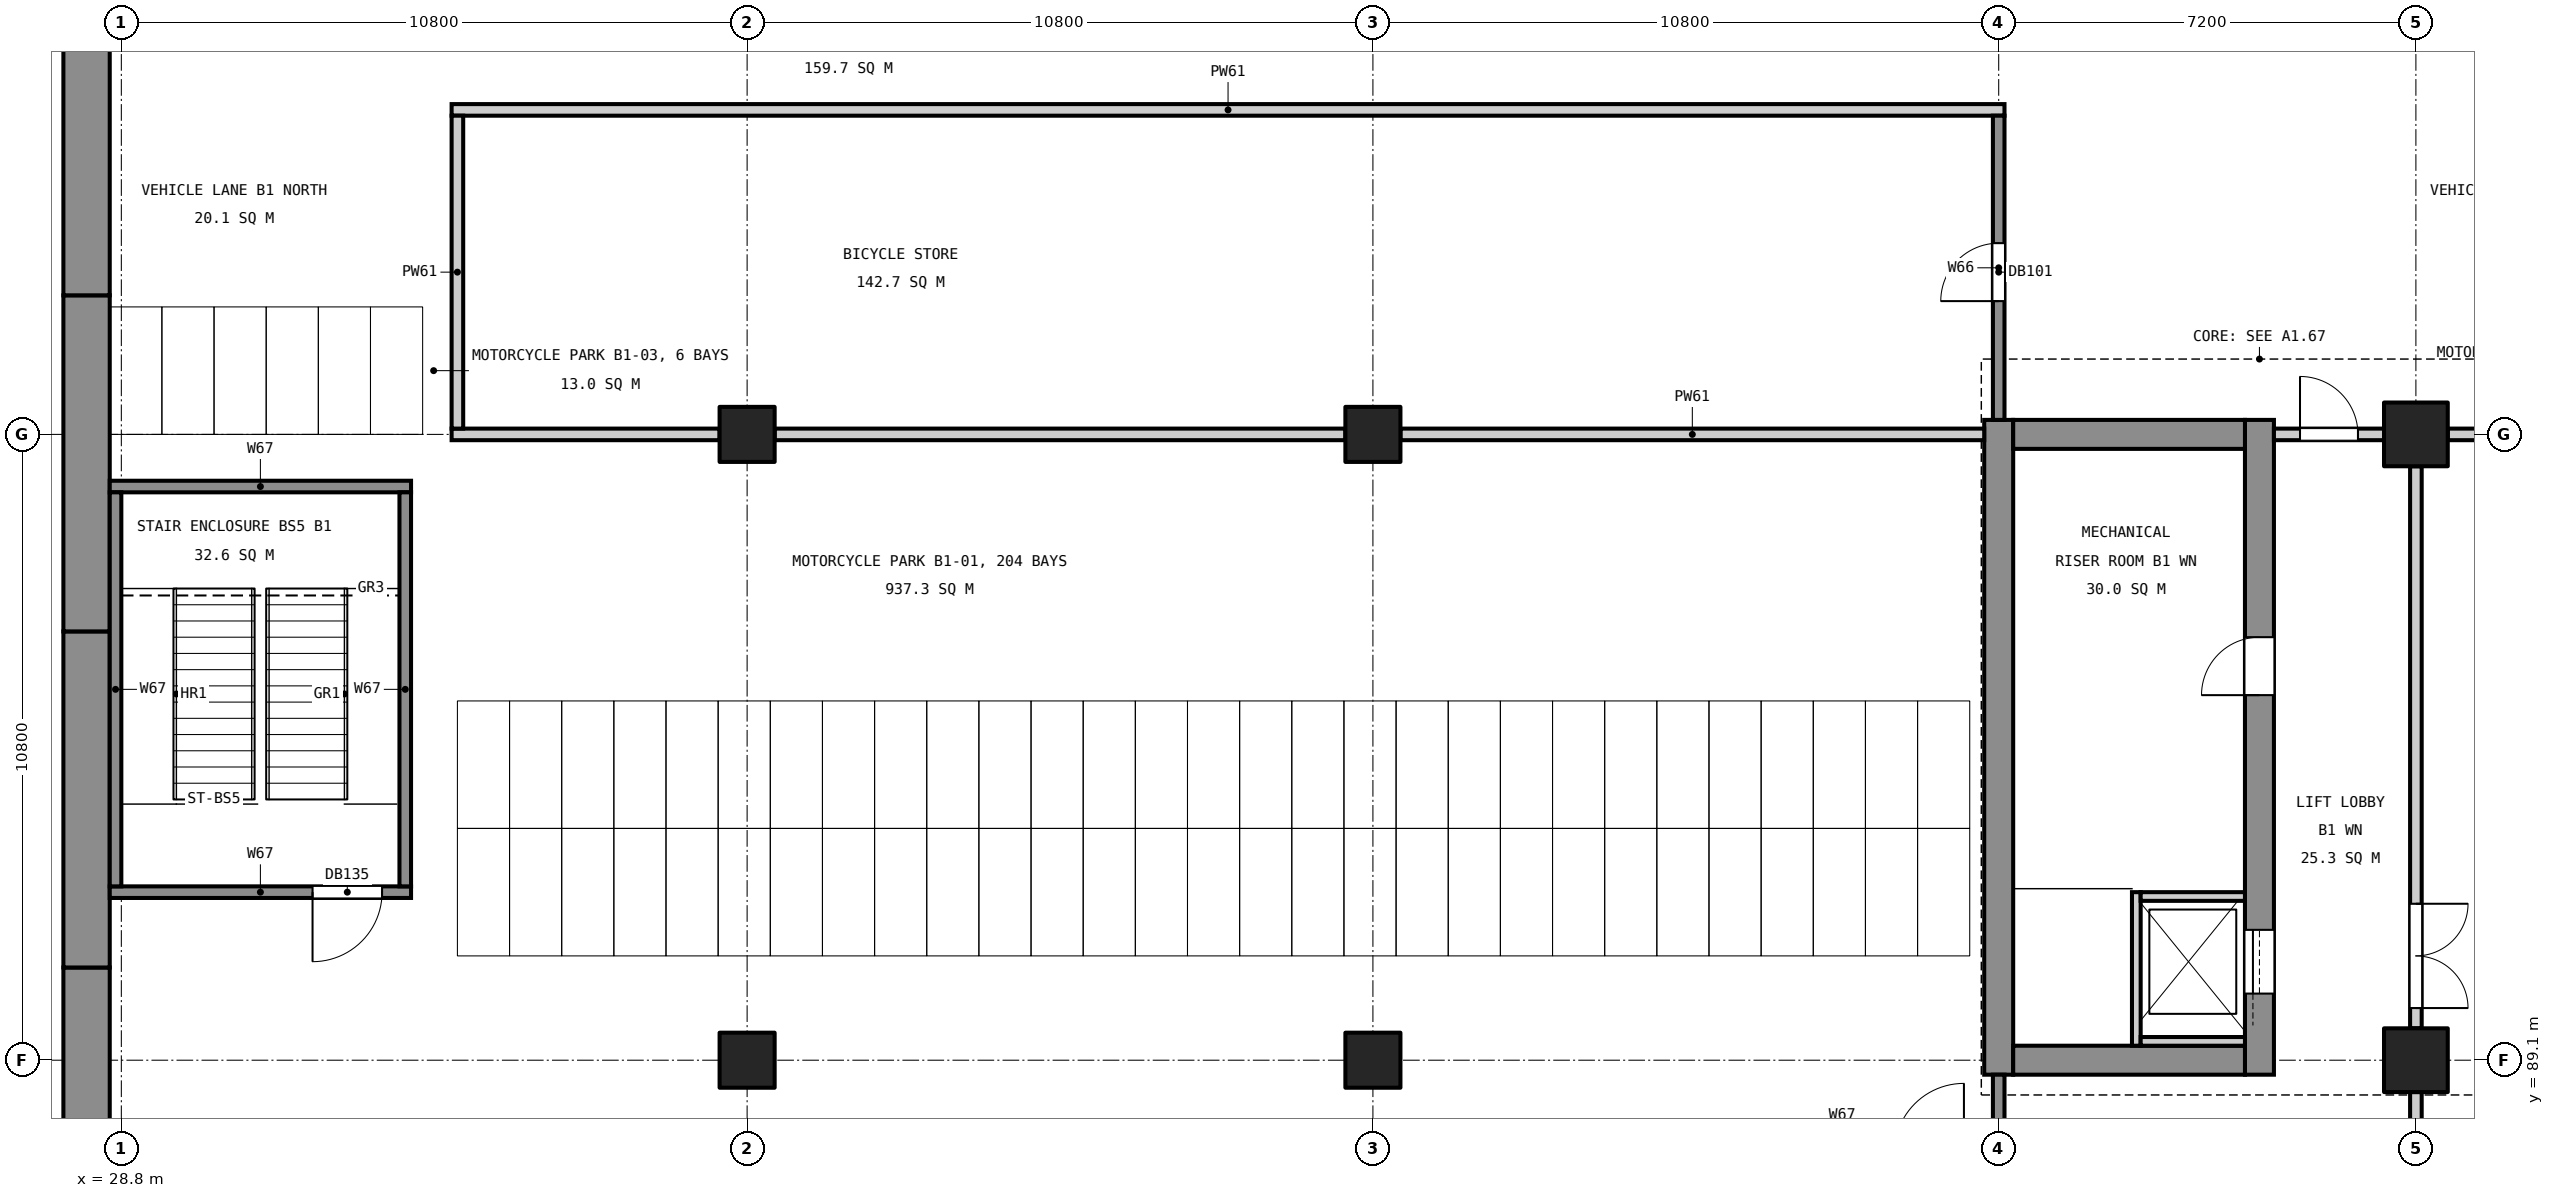
"""IFC4 building model, lengths in metres.
Left out: names, types, materials, properties, quantities, classifications, styles, units other than length and angle.
Written with IfcOpenShell. Run it as: python <this file> out.ifc"""

import sys

from ifc_helpers import new_model, si_unit, direction, frame, frame_2d, origin, origin_2d, place, context, subcontext, project, spatial, rectangle, extrude, element, fill, save


model = new_model("IFC4")
c1 = context("Model", 3, precision=1e-05, world=origin(), true_north=direction((0.0, 1.0)))
c2 = subcontext(c1, "Body", "Model", "MODEL_VIEW")
j1 = project(units=[si_unit("LENGTHUNIT", "METRE"), si_unit("PLANEANGLEUNIT", "RADIAN")], contexts=[c1])
p1 = place(None, origin())
s1 = spatial("IfcSite", under=j1, at=p1, CompositionType="ELEMENT")
p2 = place(p1, origin())
s2 = spatial("IfcBuilding", under=s1, at=p2, CompositionType="ELEMENT")
p3 = place(p2, frame((0.0, 0.0, -4.8)))
s3 = spatial("IfcBuildingStorey", under=s2, at=p3, CompositionType="ELEMENT", Elevation=-4.8)
for number, where, z_axis, x_axis in (
    (1, (68.4, 89.1, 0.0), (0.0, 0.0, 1.0), (1.0, 0.0, 0.0)),
    (2, (68.4, 99.9, 0.0), (0.0, 0.0, 1.0), (1.0, 0.0, 0.0)),
):
    element("IfcColumn", number, at=place(p3, frame(where, z_axis=z_axis, x_axis=x_axis)), inside=s3, PredefinedType="COLUMN", context=c2, shape_type="SweptSolid", body=[
        extrude(rectangle(XDim=1.1, YDim=1.1, at=origin_2d()), origin(), (0.0, 0.0, 1.0), 4.5),
    ])
for number, where, z_axis, x_axis in (
    (3, (39.6, 89.1, 0.0), (0.0, 0.0, 1.0), (1.0, 0.0, 0.0)),
    (4, (39.6, 99.9, 0.0), (0.0, 0.0, 1.0), (1.0, 0.0, 0.0)),
    (5, (50.4, 89.1, 0.0), (0.0, 0.0, 1.0), (1.0, 0.0, 0.0)),
    (6, (50.4, 99.9, 0.0), (0.0, 0.0, 1.0), (1.0, 0.0, 0.0)),
):
    element("IfcColumn", number, at=place(p3, frame(where, z_axis=z_axis, x_axis=x_axis)), inside=s3, PredefinedType="COLUMN", context=c2, shape_type="SweptSolid", body=[
        extrude(rectangle(XDim=0.95, YDim=0.95, at=origin_2d()), origin(), (0.0, 0.0, 1.0), 4.35),
    ])
for number, where, z_axis, x_axis in (
    (7, (28.2, 84.9, -18.2), (0.0, 0.0, 1.0), (0.0, 1.0, 0.0)),
    (8, (28.2, 90.7, -18.2), (0.0, 0.0, 1.0), (0.0, 1.0, 0.0)),
    (9, (28.2, 96.5, -18.2), (0.0, 0.0, 1.0), (0.0, 1.0, 0.0)),
    (10, (28.2, 102.3, -18.2), (0.0, 0.0, 1.0), (0.0, 1.0, 0.0)),
):
    element("IfcWall", number, at=place(p3, frame(where, z_axis=z_axis, x_axis=x_axis)), inside=s3, PredefinedType="SOLIDWALL", context=c2, shape_type="SweptSolid", body=[
        extrude(rectangle(XDim=5.8, YDim=0.8, at=frame_2d((2.9, 0.0))), origin(), (0.0, 0.0, 1.0), 21.55),
    ])
p4 = place(p3, frame((61.2, 88.85, 0.0), z_axis=(0.0, 0.0, 1.0), x_axis=(0.0, 1.0, 0.0)))
e11 = element("IfcWall", 11, at=p4, inside=s3, PredefinedType="SHEAR", context=c2, shape_type="SweptSolid", body=[
    extrude(rectangle(XDim=11.3, YDim=0.5, at=frame_2d((5.65, 0.0))), origin(), (0.0, 0.0, 1.0), 4.5),
])
p5 = place(p3, frame((65.7, 88.85, 0.0), z_axis=(0.0, 0.0, 1.0), x_axis=(0.0, 1.0, 0.0)))
e12 = element("IfcWall", 12, at=p5, inside=s3, PredefinedType="SHEAR", context=c2, shape_type="SweptSolid", body=[
    extrude(rectangle(XDim=11.3, YDim=0.5, at=frame_2d((5.65, 0.0))), origin(), (0.0, 0.0, 1.0), 4.5),
])
p6 = place(p5, frame((1.4, 0.0, 0.0)))
e13 = element("IfcOpeningElement", 13, at=p6, cuts=e12, PredefinedType="OPENING", context=c2, shape_type="SweptSolid", body=[
    extrude(rectangle(XDim=1.1, YDim=2.1, at=frame_2d((0.55, 1.05))), frame((0.0, 0.26, 0.0), z_axis=(0.0, -1.0, 0.0), x_axis=(1.0, 0.0, 0.0)), (0.0, 0.0, 1.0), 0.52),
])
p7 = place(p5, frame((6.55, 0.0, 0.0)))
e14 = element("IfcOpeningElement", 14, at=p7, cuts=e12, PredefinedType="OPENING", context=c2, shape_type="SweptSolid", body=[
    extrude(rectangle(XDim=1.0, YDim=2.1, at=frame_2d((0.5, 1.05))), frame((0.0, 0.26, 0.0), z_axis=(0.0, -1.0, 0.0), x_axis=(1.0, 0.0, 0.0)), (0.0, 0.0, 1.0), 0.52),
])
for number, where, z_axis, x_axis in (
    (15, (61.45, 89.1, 0.0), (0.0, 0.0, 1.0), (1.0, 0.0, 0.0)),
    (16, (61.45, 99.9, 0.0), (0.0, 0.0, 1.0), (1.0, 0.0, 0.0)),
):
    element("IfcWall", number, at=place(p3, frame(where, z_axis=z_axis, x_axis=x_axis)), inside=s3, PredefinedType="SHEAR", context=c2, shape_type="SweptSolid", body=[
        extrude(rectangle(XDim=4.0, YDim=0.5, at=frame_2d((2.0, 0.0))), origin(), (0.0, 0.0, 1.0), 4.5),
    ])
p8 = place(p3, frame((63.575, 92.0, 0.0), z_axis=(0.0, 0.0, 1.0), x_axis=(0.0, -1.0, 0.0)))
e17 = element("IfcWall", 17, at=p8, inside=s3, PredefinedType="SOLIDWALL", context=c2, shape_type="SweptSolid", body=[
    extrude(rectangle(XDim=2.65, YDim=0.15, at=frame_2d((1.325, 0.0))), origin(), (0.0, 0.0, 1.0), 4.8),
])
for number, where, z_axis, x_axis in (
    (18, (63.65, 91.925, 0.0), (0.0, 0.0, 1.0), (1.0, 0.0, 0.0)),
    (19, (63.65, 89.425, 0.0), (0.0, 0.0, 1.0), (1.0, 0.0, 0.0)),
):
    element("IfcWall", number, at=place(p3, frame(where, z_axis=z_axis, x_axis=x_axis)), inside=s3, PredefinedType="SOLIDWALL", context=c2, shape_type="SweptSolid", body=[
        extrude(rectangle(XDim=1.8, YDim=0.15, at=frame_2d((0.9, 0.0))), origin(), (0.0, 0.0, 1.0), 4.8),
    ])
p9 = place(p3, frame((28.6, 92.0, 0.0), z_axis=(0.0, 0.0, 1.0), x_axis=(1.0, 0.0, 0.0)))
e20 = element("IfcWall", 20, at=p9, inside=s3, PredefinedType="SOLIDWALL", context=c2, shape_type="SweptSolid", body=[
    extrude(rectangle(XDim=5.2, YDim=0.2, at=frame_2d((2.6, 0.0))), origin(), (0.0, 0.0, 1.0), 4.35),
])
p10 = place(p9, frame((3.5, 0.0, 0.0)))
e21 = element("IfcOpeningElement", 21, at=p10, cuts=e20, PredefinedType="OPENING", context=c2, shape_type="SweptSolid", body=[
    extrude(rectangle(XDim=1.2, YDim=2.1, at=frame_2d((0.6, 1.05))), frame((0.0, 0.11, 0.0), z_axis=(0.0, -1.0, 0.0), x_axis=(1.0, 0.0, 0.0)), (0.0, 0.0, 1.0), 0.22),
])
p11 = place(p3, frame((28.6, 99.0, 0.0), z_axis=(0.0, 0.0, 1.0), x_axis=(1.0, 0.0, 0.0)))
e22 = element("IfcWall", 22, at=p11, inside=s3, PredefinedType="SOLIDWALL", context=c2, shape_type="SweptSolid", body=[
    extrude(rectangle(XDim=5.2, YDim=0.2, at=frame_2d((2.6, 0.0))), origin(), (0.0, 0.0, 1.0), 4.35),
])
p12 = place(p3, frame((34.5, 99.9, 0.0), z_axis=(0.0, 0.0, 1.0), x_axis=(1.0, 0.0, 0.0)))
e23 = element("IfcWall", 23, at=p12, inside=s3, PredefinedType="PARTITIONING", context=c2, shape_type="SweptSolid", body=[
    extrude(rectangle(XDim=4.625, YDim=0.2, at=frame_2d((2.312, 0.0))), origin(), (0.0, 0.0, 1.0), 4.35),
])
p13 = place(p3, frame((40.075, 99.9, 0.0), z_axis=(0.0, 0.0, 1.0), x_axis=(1.0, 0.0, 0.0)))
e24 = element("IfcWall", 24, at=p13, inside=s3, PredefinedType="PARTITIONING", context=c2, shape_type="SweptSolid", body=[
    extrude(rectangle(XDim=9.85, YDim=0.2, at=frame_2d((4.925, 0.0))), origin(), (0.0, 0.0, 1.0), 4.35),
])
p14 = place(p3, frame((50.875, 99.9, 0.0), z_axis=(0.0, 0.0, 1.0), x_axis=(1.0, 0.0, 0.0)))
e25 = element("IfcWall", 25, at=p14, inside=s3, PredefinedType="PARTITIONING", context=c2, shape_type="SweptSolid", body=[
    extrude(rectangle(XDim=10.075, YDim=0.2, at=frame_2d((5.038, 0.0))), origin(), (0.0, 0.0, 1.0), 4.35),
])
p15 = place(p3, frame((65.95, 99.9, 0.0), z_axis=(0.0, 0.0, 1.0), x_axis=(1.0, 0.0, 0.0)))
e26 = element("IfcWall", 26, at=p15, inside=s3, PredefinedType="PARTITIONING", context=c2, shape_type="SweptSolid", body=[
    extrude(rectangle(XDim=1.9, YDim=0.2, at=frame_2d((0.95, 0.0))), origin(), (0.0, 0.0, 1.0), 3.7),
])
p16 = place(p15, frame((0.45, 0.0, 0.0)))
e27 = element("IfcOpeningElement", 27, at=p16, cuts=e26, PredefinedType="OPENING", context=c2, shape_type="SweptSolid", body=[
    extrude(rectangle(XDim=1.0, YDim=2.1, at=frame_2d((0.5, 1.05))), frame((0.0, 0.11, 0.0), z_axis=(0.0, -1.0, 0.0), x_axis=(1.0, 0.0, 0.0)), (0.0, 0.0, 1.0), 0.22),
])
p17 = place(p3, frame((68.95, 99.9, 0.0), z_axis=(0.0, 0.0, 1.0), x_axis=(1.0, 0.0, 0.0)))
e28 = element("IfcWall", 28, at=p17, inside=s3, PredefinedType="PARTITIONING", context=c2, shape_type="SweptSolid", body=[
    extrude(rectangle(XDim=9.7, YDim=0.2, at=frame_2d((4.85, 0.0))), origin(), (0.0, 0.0, 1.0), 3.7),
])
p18 = place(p3, frame((34.5, 105.5, 0.0), z_axis=(0.0, 0.0, 1.0), x_axis=(1.0, 0.0, 0.0)))
e29 = element("IfcWall", 29, at=p18, inside=s3, PredefinedType="PARTITIONING", context=c2, shape_type="SweptSolid", body=[
    extrude(rectangle(XDim=26.8, YDim=0.2, at=frame_2d((13.4, 0.0))), origin(), (0.0, 0.0, 1.0), 4.35),
])
for number, where, z_axis, x_axis in (
    (30, (28.7, 92.1, 0.0), (0.0, 0.0, 1.0), (0.0, 1.0, 0.0)),
    (31, (33.7, 92.1, 0.0), (0.0, 0.0, 1.0), (0.0, 1.0, 0.0)),
):
    element("IfcWall", number, at=place(p3, frame(where, z_axis=z_axis, x_axis=x_axis)), inside=s3, PredefinedType="SOLIDWALL", context=c2, shape_type="SweptSolid", body=[
        extrude(rectangle(XDim=6.8, YDim=0.2, at=frame_2d((3.4, 0.0))), origin(), (0.0, 0.0, 1.0), 4.35),
    ])
p19 = place(p3, frame((34.6, 100.0, 0.0), z_axis=(0.0, 0.0, 1.0), x_axis=(0.0, 1.0, 0.0)))
e32 = element("IfcWall", 32, at=p19, inside=s3, PredefinedType="PARTITIONING", context=c2, shape_type="SweptSolid", body=[
    extrude(rectangle(XDim=5.4, YDim=0.2, at=frame_2d((2.7, 0.0))), origin(), (0.0, 0.0, 1.0), 4.35),
])
p20 = place(p3, frame((61.2, 78.85, 0.0), z_axis=(0.0, 0.0, 1.0), x_axis=(0.0, 1.0, 0.0)))
e33 = element("IfcWall", 33, at=p20, inside=s3, PredefinedType="SOLIDWALL", context=c2, shape_type="SweptSolid", body=[
    extrude(rectangle(XDim=10.0, YDim=0.2, at=frame_2d((5.0, 0.0))), origin(), (0.0, 0.0, 1.0), 4.5),
])
p21 = place(p3, frame((61.2, 100.15, 0.0), z_axis=(0.0, 0.0, 1.0), x_axis=(0.0, 1.0, 0.0)))
e34 = element("IfcWall", 34, at=p21, inside=s3, PredefinedType="SOLIDWALL", context=c2, shape_type="SweptSolid", body=[
    extrude(rectangle(XDim=5.25, YDim=0.2, at=frame_2d((2.625, 0.0))), origin(), (0.0, 0.0, 1.0), 4.35),
])
p22 = place(p21, frame((2.05, 0.0, 0.0)))
e35 = element("IfcOpeningElement", 35, at=p22, cuts=e34, PredefinedType="OPENING", context=c2, shape_type="SweptSolid", body=[
    extrude(rectangle(XDim=1.0, YDim=2.1, at=frame_2d((0.5, 1.05))), frame((0.0, 0.11, 0.0), z_axis=(0.0, -1.0, 0.0), x_axis=(1.0, 0.0, 0.0)), (0.0, 0.0, 1.0), 0.22),
])
p23 = place(p3, frame((68.4, 82.0, 0.0), z_axis=(0.0, 0.0, 1.0), x_axis=(0.0, 1.0, 0.0)))
e36 = element("IfcWall", 36, at=p23, inside=s3, PredefinedType="PARTITIONING", context=c2, shape_type="SweptSolid", body=[
    extrude(rectangle(XDim=6.55, YDim=0.2, at=frame_2d((3.275, 0.0))), origin(), (0.0, 0.0, 1.0), 3.4),
])
p24 = place(p3, frame((68.4, 89.65, 0.0), z_axis=(0.0, 0.0, 1.0), x_axis=(0.0, 1.0, 0.0)))
e37 = element("IfcWall", 37, at=p24, inside=s3, PredefinedType="PARTITIONING", context=c2, shape_type="SweptSolid", body=[
    extrude(rectangle(XDim=9.7, YDim=0.2, at=frame_2d((4.85, 0.0))), origin(), (0.0, 0.0, 1.0), 3.4),
])
p25 = place(p24, frame((0.35, 0.0, 0.0)))
e38 = element("IfcOpeningElement", 38, at=p25, cuts=e37, PredefinedType="OPENING", context=c2, shape_type="SweptSolid", body=[
    extrude(rectangle(XDim=1.8, YDim=2.1, at=frame_2d((0.9, 1.05))), frame((0.0, 0.11, 0.0), z_axis=(0.0, -1.0, 0.0), x_axis=(1.0, 0.0, 0.0)), (0.0, 0.0, 1.0), 0.22),
])
p26 = place(p6, origin())
e39 = element("IfcDoor", 39, at=p26, inside=s3, OperationType="SLIDING_TO_LEFT", PredefinedType="DOOR", context=c2, shape_type="SweptSolid", body=[
    extrude(rectangle(XDim=1.1, YDim=2.1, at=frame_2d((0.55, 1.05))), frame((0.0, 0.025, 0.0), z_axis=(0.0, -1.0, 0.0), x_axis=(1.0, 0.0, 0.0)), (0.0, 0.0, 1.0), 0.05),
])
fill(e13, e39)
p27 = place(p22, origin())
e40 = element("IfcDoor", 40, at=p27, inside=s3, OperationType="SINGLE_SWING_LEFT", PredefinedType="DOOR", context=c2, shape_type="SweptSolid", body=[
    extrude(rectangle(XDim=1.0, YDim=2.1, at=frame_2d((0.5, 1.05))), frame((0.0, 0.025, 0.0), z_axis=(0.0, -1.0, 0.0), x_axis=(1.0, 0.0, 0.0)), (0.0, 0.0, 1.0), 0.05),
])
fill(e35, e40)
p28 = place(p25, frame((1.8, 0.0, 0.0), z_axis=(0.0, 0.0, 1.0), x_axis=(-1.0, 0.0, 0.0)))
e41 = element("IfcDoor", 41, at=p28, inside=s3, OperationType="DOUBLE_DOOR_SINGLE_SWING", PredefinedType="DOOR", context=c2, shape_type="SweptSolid", body=[
    extrude(rectangle(XDim=1.8, YDim=2.1, at=frame_2d((0.9, 1.05))), frame((0.0, 0.025, 0.0), z_axis=(0.0, -1.0, 0.0), x_axis=(1.0, 0.0, 0.0)), (0.0, 0.0, 1.0), 0.05),
])
fill(e38, e41)
p29 = place(p16, origin())
e42 = element("IfcDoor", 42, at=p29, inside=s3, OperationType="SINGLE_SWING_LEFT", PredefinedType="DOOR", context=c2, shape_type="SweptSolid", body=[
    extrude(rectangle(XDim=1.0, YDim=2.1, at=frame_2d((0.5, 1.05))), frame((0.0, 0.025, 0.0), z_axis=(0.0, -1.0, 0.0), x_axis=(1.0, 0.0, 0.0)), (0.0, 0.0, 1.0), 0.05),
])
fill(e27, e42)
p30 = place(p7, origin())
e43 = element("IfcDoor", 43, at=p30, inside=s3, OperationType="SINGLE_SWING_LEFT", PredefinedType="DOOR", context=c2, shape_type="SweptSolid", body=[
    extrude(rectangle(XDim=1.0, YDim=2.1, at=frame_2d((0.5, 1.05))), frame((0.0, 0.025, 0.0), z_axis=(0.0, -1.0, 0.0), x_axis=(1.0, 0.0, 0.0)), (0.0, 0.0, 1.0), 0.05),
])
fill(e14, e43)
p31 = place(p10, frame((1.2, 0.0, 0.0), z_axis=(0.0, 0.0, 1.0), x_axis=(-1.0, 0.0, 0.0)))
e44 = element("IfcDoor", 44, at=p31, inside=s3, OperationType="SINGLE_SWING_RIGHT", PredefinedType="DOOR", context=c2, shape_type="SweptSolid", body=[
    extrude(rectangle(XDim=1.2, YDim=2.1, at=frame_2d((0.6, 1.05))), frame((0.0, 0.025, 0.0), z_axis=(0.0, -1.0, 0.0), x_axis=(1.0, 0.0, 0.0)), (0.0, 0.0, 1.0), 0.05),
])
fill(e21, e44)
save(model, sys.argv[1])
